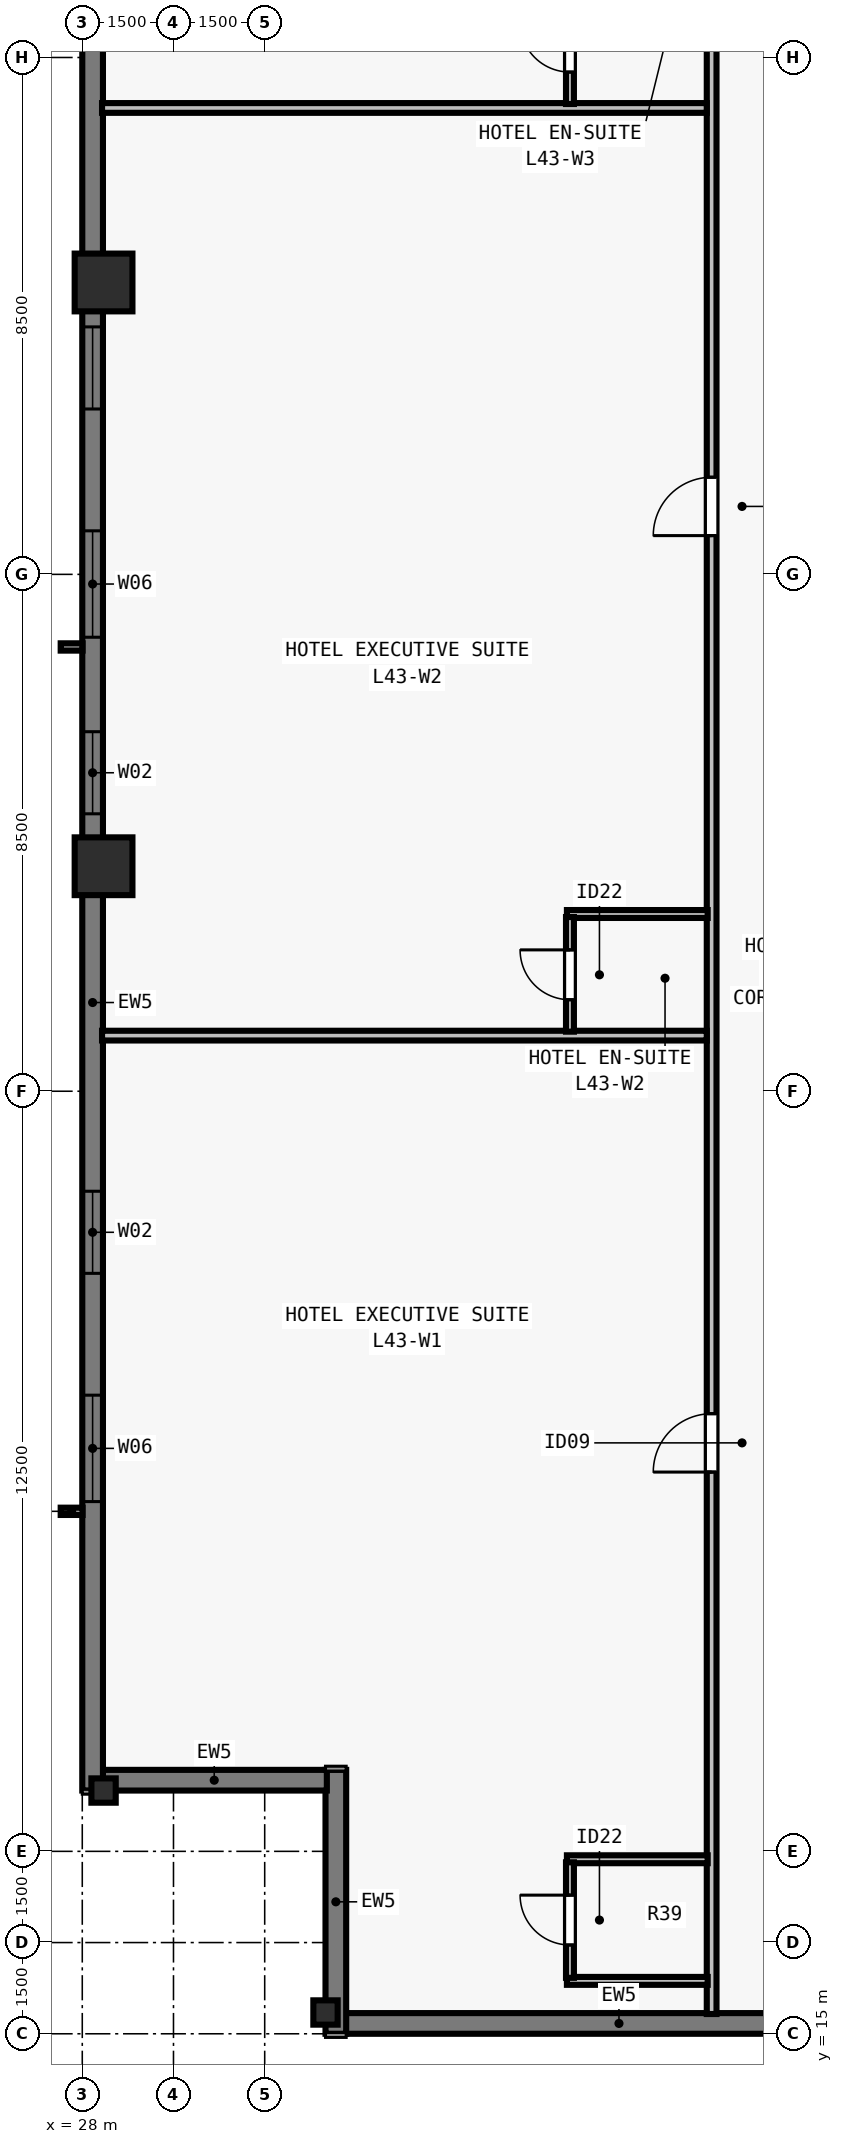
"""IFC4 building model, lengths in metres.
Left out: names, types, materials, properties, quantities, classifications, styles, units other than length and angle.
Written with IfcOpenShell. Run it as: python <this file> out.ifc"""

import sys

from ifc_helpers import new_model, si_unit, direction, frame, frame_2d, origin, origin_2d, place, context, subcontext, project, spatial, rectangle, i_section, extrude, element, fill, save


model = new_model("IFC4")
c1 = context("Model", 3, precision=1e-05, world=origin(), true_north=direction((0.0, 1.0)))
c2 = subcontext(c1, "Body", "Model", "MODEL_VIEW")
j1 = project(units=[si_unit("LENGTHUNIT", "METRE"), si_unit("PLANEANGLEUNIT", "RADIAN")], contexts=[c1])
p1 = place(None, origin())
s1 = spatial("IfcSite", under=j1, at=p1, CompositionType="ELEMENT")
p2 = place(p1, origin())
s2 = spatial("IfcBuilding", under=s1, at=p2, CompositionType="ELEMENT")
p3 = place(p2, frame((0.0, 0.0, 158.5)))
s3 = spatial("IfcBuildingStorey", under=s2, at=p3, CompositionType="ELEMENT", Elevation=158.5)
p4 = place(p3, frame((32.0, 15.35, 0.0), z_axis=(0.0, 0.0, 1.0), x_axis=(1.0, 0.0, 0.0)))
e1 = element("IfcColumn", 1, at=p4, inside=s3, PredefinedType="COLUMN", context=c2, shape_type="SweptSolid", body=[
    extrude(i_section(OverallWidth=0.4, OverallDepth=0.4, WebThickness=0.022, FlangeThickness=0.036, at=origin_2d()), origin(), (0.0, 0.0, 1.0), 3.5),
])
for number, where, z_axis, x_axis in (
    (2, (28.35, 43.8, 0.0), (0.0, 0.0, 1.0), (0.0, 1.0, 0.0)),
    (3, (28.35, 34.2, 0.0), (0.0, 0.0, 1.0), (0.0, 1.0, 0.0)),
):
    element("IfcColumn", number, at=place(p3, frame(where, z_axis=z_axis, x_axis=x_axis)), inside=s3, PredefinedType="COLUMN", context=c2, shape_type="SweptSolid", body=[
        extrude(rectangle(XDim=0.95, YDim=0.95, at=origin_2d()), origin(), (0.0, 0.0, 1.0), 3.5),
    ])
p5 = place(p3, frame((28.35, 19.0, 0.0), z_axis=(0.0, 0.0, 1.0), x_axis=(0.0, 1.0, 0.0)))
e4 = element("IfcColumn", 4, at=p5, inside=s3, PredefinedType="COLUMN", context=c2, shape_type="SweptSolid", body=[
    extrude(i_section(OverallWidth=0.4, OverallDepth=0.4, WebThickness=0.022, FlangeThickness=0.036, at=origin_2d()), origin(), (0.0, 0.0, 1.0), 3.5),
])
p6 = place(p3, frame((49.4, 15.17, 0.0), z_axis=(0.0, 0.0, 1.0), x_axis=(-1.0, 0.0, 0.0)))
e5 = element("IfcWall", 5, at=p6, inside=s3, PredefinedType="SOLIDWALL", context=c2, shape_type="SweptSolid", body=[
    extrude(rectangle(XDim=17.082, YDim=0.34, at=frame_2d((8.541, 0.0))), origin(), (0.0, 0.0, 1.0), 3.28),
])
p7 = place(p6, frame((6.566, 0.0, 0.8)))
e6 = element("IfcOpeningElement", 6, at=p7, cuts=e5, PredefinedType="OPENING", context=c2, shape_type="SweptSolid", body=[
    extrude(rectangle(XDim=1.35, YDim=1.66, at=frame_2d((0.675, 0.83))), frame((0.0, 0.18, 0.0), z_axis=(0.0, -1.0, 0.0), x_axis=(1.0, 0.0, 0.0)), (0.0, 0.0, 1.0), 0.36),
])
p8 = place(p6, frame((0.71, 0.0, 0.8)))
e7 = element("IfcOpeningElement", 7, at=p8, cuts=e5, PredefinedType="OPENING", context=c2, shape_type="SweptSolid", body=[
    extrude(rectangle(XDim=0.75, YDim=1.66, at=frame_2d((0.375, 0.83))), frame((0.0, 0.18, 0.0), z_axis=(0.0, -1.0, 0.0), x_axis=(1.0, 0.0, 0.0)), (0.0, 0.0, 1.0), 0.36),
])
p9 = place(p3, frame((32.17, 15.0, 0.0), z_axis=(0.0, 0.0, 1.0), x_axis=(0.0, 1.0, 0.0)))
e8 = element("IfcWall", 8, at=p9, inside=s3, PredefinedType="SOLIDWALL", context=c2, shape_type="SweptSolid", body=[
    extrude(rectangle(XDim=4.34, YDim=0.34, at=frame_2d((2.17, 0.0))), origin(), (0.0, 0.0, 1.0), 3.28),
])
p10 = place(p3, frame((32.022, 19.17, 0.0), z_axis=(0.0, 0.0, 1.0), x_axis=(-1.0, 0.0, 0.0)))
e9 = element("IfcWall", 9, at=p10, inside=s3, PredefinedType="SOLIDWALL", context=c2, shape_type="SweptSolid", body=[
    extrude(rectangle(XDim=3.704, YDim=0.34, at=frame_2d((1.852, 0.0))), origin(), (0.0, 0.0, 1.0), 3.28),
])
p11 = place(p3, frame((28.17, 19.0, 0.0), z_axis=(0.0, 0.0, 1.0), x_axis=(0.0, 1.0, 0.0)))
e10 = element("IfcWall", 10, at=p11, inside=s3, PredefinedType="SOLIDWALL", context=c2, shape_type="SweptSolid", body=[
    extrude(rectangle(XDim=39.682, YDim=0.34, at=frame_2d((19.841, 0.0))), origin(), (0.0, 0.0, 1.0), 3.28),
])
p12 = place(p11, frame((4.752, 0.0, 0.8)))
e11 = element("IfcOpeningElement", 11, at=p12, cuts=e10, PredefinedType="OPENING", context=c2, shape_type="SweptSolid", body=[
    extrude(rectangle(XDim=1.75, YDim=1.66, at=frame_2d((0.875, 0.83))), frame((0.0, 0.18, 0.0), z_axis=(0.0, -1.0, 0.0), x_axis=(1.0, 0.0, 0.0)), (0.0, 0.0, 1.0), 0.36),
])
p13 = place(p11, frame((8.505, 0.0, 0.8)))
e12 = element("IfcOpeningElement", 12, at=p13, cuts=e10, PredefinedType="OPENING", context=c2, shape_type="SweptSolid", body=[
    extrude(rectangle(XDim=1.35, YDim=1.66, at=frame_2d((0.675, 0.83))), frame((0.0, 0.18, 0.0), z_axis=(0.0, -1.0, 0.0), x_axis=(1.0, 0.0, 0.0)), (0.0, 0.0, 1.0), 0.36),
])
p14 = place(p11, frame((16.062, 0.0, 0.8)))
e13 = element("IfcOpeningElement", 13, at=p14, cuts=e10, PredefinedType="OPENING", context=c2, shape_type="SweptSolid", body=[
    extrude(rectangle(XDim=1.35, YDim=1.66, at=frame_2d((0.675, 0.83))), frame((0.0, 0.18, 0.0), z_axis=(0.0, -1.0, 0.0), x_axis=(1.0, 0.0, 0.0)), (0.0, 0.0, 1.0), 0.36),
])
p15 = place(p11, frame((18.966, 0.0, 0.8)))
e14 = element("IfcOpeningElement", 14, at=p15, cuts=e10, PredefinedType="OPENING", context=c2, shape_type="SweptSolid", body=[
    extrude(rectangle(XDim=1.75, YDim=1.66, at=frame_2d((0.875, 0.83))), frame((0.0, 0.18, 0.0), z_axis=(0.0, -1.0, 0.0), x_axis=(1.0, 0.0, 0.0)), (0.0, 0.0, 1.0), 0.36),
])
p16 = place(p11, frame((22.719, 0.0, 0.8)))
e15 = element("IfcOpeningElement", 15, at=p16, cuts=e10, PredefinedType="OPENING", context=c2, shape_type="SweptSolid", body=[
    extrude(rectangle(XDim=1.35, YDim=1.66, at=frame_2d((0.675, 0.83))), frame((0.0, 0.18, 0.0), z_axis=(0.0, -1.0, 0.0), x_axis=(1.0, 0.0, 0.0)), (0.0, 0.0, 1.0), 0.36),
])
p17 = place(p11, frame((29.827, 0.0, 0.8)))
e16 = element("IfcOpeningElement", 16, at=p17, cuts=e10, PredefinedType="OPENING", context=c2, shape_type="SweptSolid", body=[
    extrude(rectangle(XDim=1.35, YDim=1.66, at=frame_2d((0.675, 0.83))), frame((0.0, 0.18, 0.0), z_axis=(0.0, -1.0, 0.0), x_axis=(1.0, 0.0, 0.0)), (0.0, 0.0, 1.0), 0.36),
])
p18 = place(p11, frame((33.18, 0.0, 0.8)))
e17 = element("IfcOpeningElement", 17, at=p18, cuts=e10, PredefinedType="OPENING", context=c2, shape_type="SweptSolid", body=[
    extrude(rectangle(XDim=1.75, YDim=1.66, at=frame_2d((0.875, 0.83))), frame((0.0, 0.18, 0.0), z_axis=(0.0, -1.0, 0.0), x_axis=(1.0, 0.0, 0.0)), (0.0, 0.0, 1.0), 0.36),
])
p19 = place(p3, frame((38.35, 15.325, 0.0), z_axis=(0.0, 0.0, 1.0), x_axis=(0.0, 1.0, 0.0)))
e18 = element("IfcWall", 18, at=p19, inside=s3, PredefinedType="PARTITIONING", context=c2, shape_type="SweptSolid", body=[
    extrude(rectangle(XDim=47.35, YDim=0.16, at=frame_2d((23.675, 0.0))), origin(), (0.0, 0.0, 1.0), 2.555),
])
p20 = place(p19, frame((8.912, 0.0, 0.0)))
e19 = element("IfcOpeningElement", 19, at=p20, cuts=e18, PredefinedType="OPENING", context=c2, shape_type="SweptSolid", body=[
    extrude(rectangle(XDim=0.96, YDim=2.15, at=frame_2d((0.48, 1.075))), frame((0.0, 0.09, 0.0), z_axis=(0.0, -1.0, 0.0), x_axis=(1.0, 0.0, 0.0)), (0.0, 0.0, 1.0), 0.18),
])
p21 = place(p19, frame((24.312, 0.0, 0.0)))
e20 = element("IfcOpeningElement", 20, at=p21, cuts=e18, PredefinedType="OPENING", context=c2, shape_type="SweptSolid", body=[
    extrude(rectangle(XDim=0.96, YDim=2.15, at=frame_2d((0.48, 1.075))), frame((0.0, 0.09, 0.0), z_axis=(0.0, -1.0, 0.0), x_axis=(1.0, 0.0, 0.0)), (0.0, 0.0, 1.0), 0.18),
])
p22 = place(p19, frame((39.895, 0.0, 0.0)))
e21 = element("IfcOpeningElement", 21, at=p22, cuts=e18, PredefinedType="OPENING", context=c2, shape_type="SweptSolid", body=[
    extrude(rectangle(XDim=0.96, YDim=2.15, at=frame_2d((0.48, 1.075))), frame((0.0, 0.09, 0.0), z_axis=(0.0, -1.0, 0.0), x_axis=(1.0, 0.0, 0.0)), (0.0, 0.0, 1.0), 0.18),
])
for number, where, z_axis, x_axis in (
    (22, (35.97, 15.87, 0.0), (0.0, 0.0, 1.0), (1.0, 0.0, 0.0)),
    (23, (35.97, 17.87, 0.0), (0.0, 0.0, 1.0), (1.0, 0.0, 0.0)),
):
    element("IfcWall", number, at=place(p3, frame(where, z_axis=z_axis, x_axis=x_axis)), inside=s3, PredefinedType="PLUMBINGWALL", context=c2, shape_type="SweptSolid", body=[
        extrude(rectangle(XDim=2.315, YDim=0.13, at=frame_2d((1.157, 0.0))), origin(), (0.0, 0.0, 1.0), 3.28),
    ])
p23 = place(p3, frame((36.02, 15.92, 0.0), z_axis=(0.0, 0.0, 1.0), x_axis=(0.0, 1.0, 0.0)))
e24 = element("IfcWall", 24, at=p23, inside=s3, PredefinedType="PLUMBINGWALL", context=c2, shape_type="SweptSolid", body=[
    extrude(rectangle(XDim=1.9, YDim=0.13, at=frame_2d((0.95, 0.0))), origin(), (0.0, 0.0, 1.0), 3.28),
])
p24 = place(p23, frame((0.54, 0.0, 0.0)))
e25 = element("IfcOpeningElement", 25, at=p24, cuts=e24, PredefinedType="OPENING", context=c2, shape_type="SweptSolid", body=[
    extrude(rectangle(XDim=0.82, YDim=2.1, at=frame_2d((0.41, 1.05))), frame((0.0, 0.075, 0.0), z_axis=(0.0, -1.0, 0.0), x_axis=(1.0, 0.0, 0.0)), (0.0, 0.0, 1.0), 0.15),
])
p25 = place(p3, frame((28.325, 31.415, 0.0), z_axis=(0.0, 0.0, 1.0), x_axis=(1.0, 0.0, 0.0)))
e26 = element("IfcWall", 26, at=p25, inside=s3, PredefinedType="PARTITIONING", context=c2, shape_type="SweptSolid", body=[
    extrude(rectangle(XDim=9.945, YDim=0.16, at=frame_2d((4.973, 0.0))), origin(), (0.0, 0.0, 1.0), 3.28),
])
p26 = place(p3, frame((35.97, 33.415, 0.0), z_axis=(0.0, 0.0, 1.0), x_axis=(1.0, 0.0, 0.0)))
e27 = element("IfcWall", 27, at=p26, inside=s3, PredefinedType="PLUMBINGWALL", context=c2, shape_type="SweptSolid", body=[
    extrude(rectangle(XDim=2.315, YDim=0.13, at=frame_2d((1.157, 0.0))), origin(), (0.0, 0.0, 1.0), 3.28),
])
p27 = place(p3, frame((36.02, 31.479, 0.0), z_axis=(0.0, 0.0, 1.0), x_axis=(0.0, 1.0, 0.0)))
e28 = element("IfcWall", 28, at=p27, inside=s3, PredefinedType="PLUMBINGWALL", context=c2, shape_type="SweptSolid", body=[
    extrude(rectangle(XDim=1.885, YDim=0.13, at=frame_2d((0.942, 0.0))), origin(), (0.0, 0.0, 1.0), 3.28),
])
p28 = place(p27, frame((0.525, 0.0, 0.0)))
e29 = element("IfcOpeningElement", 29, at=p28, cuts=e28, PredefinedType="OPENING", context=c2, shape_type="SweptSolid", body=[
    extrude(rectangle(XDim=0.82, YDim=2.1, at=frame_2d((0.41, 1.05))), frame((0.0, 0.075, 0.0), z_axis=(0.0, -1.0, 0.0), x_axis=(1.0, 0.0, 0.0)), (0.0, 0.0, 1.0), 0.15),
])
p29 = place(p3, frame((28.325, 46.67, 0.0), z_axis=(0.0, 0.0, 1.0), x_axis=(1.0, 0.0, 0.0)))
e30 = element("IfcWall", 30, at=p29, inside=s3, PredefinedType="PARTITIONING", context=c2, shape_type="SweptSolid", body=[
    extrude(rectangle(XDim=9.945, YDim=0.16, at=frame_2d((4.973, 0.0))), origin(), (0.0, 0.0, 1.0), 3.28),
])
p30 = place(p3, frame((36.02, 46.735, 0.0), z_axis=(0.0, 0.0, 1.0), x_axis=(0.0, 1.0, 0.0)))
e31 = element("IfcWall", 31, at=p30, inside=s3, PredefinedType="PLUMBINGWALL", context=c2, shape_type="SweptSolid", body=[
    extrude(rectangle(XDim=1.885, YDim=0.13, at=frame_2d((0.942, 0.0))), origin(), (0.0, 0.0, 1.0), 3.28),
])
p31 = place(p30, frame((0.525, 0.0, 0.0)))
e32 = element("IfcOpeningElement", 32, at=p31, cuts=e31, PredefinedType="OPENING", context=c2, shape_type="SweptSolid", body=[
    extrude(rectangle(XDim=0.82, YDim=2.1, at=frame_2d((0.41, 1.05))), frame((0.0, 0.075, 0.0), z_axis=(0.0, -1.0, 0.0), x_axis=(1.0, 0.0, 0.0)), (0.0, 0.0, 1.0), 0.15),
])
p32 = place(p12, origin())
e33 = element("IfcWindow", 33, at=p32, inside=s3, PartitioningType="SINGLE_PANEL", PredefinedType="WINDOW", context=c2, shape_type="SweptSolid", body=[
    extrude(rectangle(XDim=1.75, YDim=1.66, at=frame_2d((0.875, 0.83))), frame((0.0, -0.05, 0.0), z_axis=(0.0, -1.0, 0.0), x_axis=(1.0, 0.0, 0.0)), (0.0, 0.0, 1.0), 0.06),
])
fill(e11, e33)
p33 = place(p13, origin())
e34 = element("IfcWindow", 34, at=p33, inside=s3, PartitioningType="SINGLE_PANEL", PredefinedType="WINDOW", context=c2, shape_type="SweptSolid", body=[
    extrude(rectangle(XDim=1.35, YDim=1.66, at=frame_2d((0.675, 0.83))), frame((0.0, -0.05, 0.0), z_axis=(0.0, -1.0, 0.0), x_axis=(1.0, 0.0, 0.0)), (0.0, 0.0, 1.0), 0.06),
])
fill(e12, e34)
p34 = place(p14, origin())
e35 = element("IfcWindow", 35, at=p34, inside=s3, PartitioningType="SINGLE_PANEL", PredefinedType="WINDOW", context=c2, shape_type="SweptSolid", body=[
    extrude(rectangle(XDim=1.35, YDim=1.66, at=frame_2d((0.675, 0.83))), frame((0.0, -0.05, 0.0), z_axis=(0.0, -1.0, 0.0), x_axis=(1.0, 0.0, 0.0)), (0.0, 0.0, 1.0), 0.06),
])
fill(e13, e35)
p35 = place(p15, origin())
e36 = element("IfcWindow", 36, at=p35, inside=s3, PartitioningType="SINGLE_PANEL", PredefinedType="WINDOW", context=c2, shape_type="SweptSolid", body=[
    extrude(rectangle(XDim=1.75, YDim=1.66, at=frame_2d((0.875, 0.83))), frame((0.0, -0.05, 0.0), z_axis=(0.0, -1.0, 0.0), x_axis=(1.0, 0.0, 0.0)), (0.0, 0.0, 1.0), 0.06),
])
fill(e14, e36)
p36 = place(p16, origin())
e37 = element("IfcWindow", 37, at=p36, inside=s3, PartitioningType="SINGLE_PANEL", PredefinedType="WINDOW", context=c2, shape_type="SweptSolid", body=[
    extrude(rectangle(XDim=1.35, YDim=1.66, at=frame_2d((0.675, 0.83))), frame((0.0, -0.05, 0.0), z_axis=(0.0, -1.0, 0.0), x_axis=(1.0, 0.0, 0.0)), (0.0, 0.0, 1.0), 0.06),
])
fill(e15, e37)
p37 = place(p24, origin())
e38 = element("IfcDoor", 38, at=p37, inside=s3, OperationType="SINGLE_SWING_RIGHT", PredefinedType="DOOR", context=c2, shape_type="SweptSolid", body=[
    extrude(rectangle(XDim=0.82, YDim=2.1, at=frame_2d((0.41, 1.05))), frame((0.0, 0.025, 0.0), z_axis=(0.0, -1.0, 0.0), x_axis=(1.0, 0.0, 0.0)), (0.0, 0.0, 1.0), 0.05),
])
fill(e25, e38)
p38 = place(p20, origin())
e39 = element("IfcDoor", 39, at=p38, inside=s3, OperationType="SINGLE_SWING_LEFT", PredefinedType="DOOR", context=c2, shape_type="SweptSolid", body=[
    extrude(rectangle(XDim=0.96, YDim=2.15, at=frame_2d((0.48, 1.075))), frame((0.0, 0.025, 0.0), z_axis=(0.0, -1.0, 0.0), x_axis=(1.0, 0.0, 0.0)), (0.0, 0.0, 1.0), 0.05),
])
fill(e19, e39)
p39 = place(p28, origin())
e40 = element("IfcDoor", 40, at=p39, inside=s3, OperationType="SINGLE_SWING_RIGHT", PredefinedType="DOOR", context=c2, shape_type="SweptSolid", body=[
    extrude(rectangle(XDim=0.82, YDim=2.1, at=frame_2d((0.41, 1.05))), frame((0.0, 0.025, 0.0), z_axis=(0.0, -1.0, 0.0), x_axis=(1.0, 0.0, 0.0)), (0.0, 0.0, 1.0), 0.05),
])
fill(e29, e40)
p40 = place(p21, origin())
e41 = element("IfcDoor", 41, at=p40, inside=s3, OperationType="SINGLE_SWING_LEFT", PredefinedType="DOOR", context=c2, shape_type="SweptSolid", body=[
    extrude(rectangle(XDim=0.96, YDim=2.15, at=frame_2d((0.48, 1.075))), frame((0.0, 0.025, 0.0), z_axis=(0.0, -1.0, 0.0), x_axis=(1.0, 0.0, 0.0)), (0.0, 0.0, 1.0), 0.05),
])
fill(e20, e41)
p41 = place(p31, origin())
e42 = element("IfcDoor", 42, at=p41, inside=s3, OperationType="SINGLE_SWING_RIGHT", PredefinedType="DOOR", context=c2, shape_type="SweptSolid", body=[
    extrude(rectangle(XDim=0.82, YDim=2.1, at=frame_2d((0.41, 1.05))), frame((0.0, 0.025, 0.0), z_axis=(0.0, -1.0, 0.0), x_axis=(1.0, 0.0, 0.0)), (0.0, 0.0, 1.0), 0.05),
])
fill(e32, e42)
save(model, sys.argv[1])
